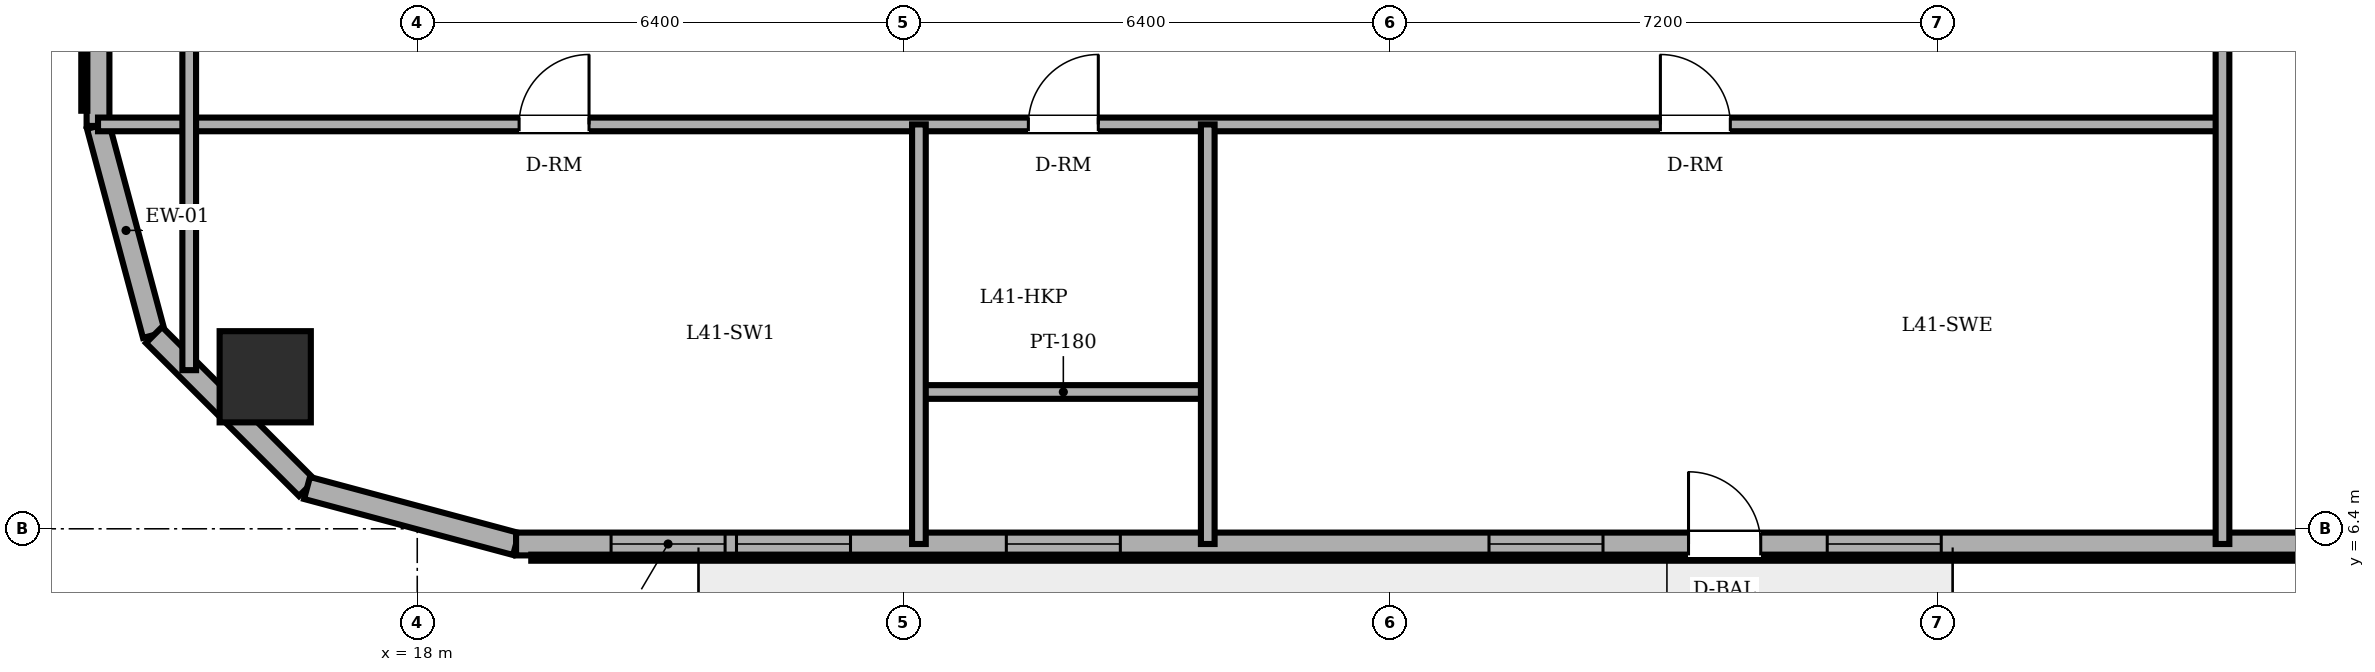
"""IFC4 building model, lengths in metres.
Left out: names, types, materials, properties, quantities, classifications, styles, units other than length and angle.
Written with IfcOpenShell. Run it as: python <this file> out.ifc"""

import sys

from ifc_helpers import new_model, si_unit, direction, frame, frame_2d, origin, origin_2d, place, context, subcontext, project, spatial, rectangle, circle, extrude, element, fill, save


model = new_model("IFC4")
c1 = context("Model", 3, precision=1e-05, world=origin(), true_north=direction((0.0, 1.0)))
c2 = subcontext(c1, "Body", "Model", "MODEL_VIEW")
j1 = project(units=[si_unit("LENGTHUNIT", "METRE"), si_unit("PLANEANGLEUNIT", "RADIAN")], contexts=[c1])
p1 = place(None, origin())
s1 = spatial("IfcSite", under=j1, at=p1, CompositionType="ELEMENT")
p2 = place(p1, origin())
s2 = spatial("IfcBuilding", under=s1, at=p2, CompositionType="ELEMENT")
p3 = place(p2, frame((0.0, 0.0, 158.2)))
s3 = spatial("IfcBuildingStorey", under=s2, at=p3, CompositionType="ELEMENT", Elevation=158.2)
p4 = place(p3, frame((16.0, 8.4, 0.0), z_axis=(0.0, 0.0, 1.0), x_axis=(1.0, 0.0, 0.0)))
e1 = element("IfcColumn", 1, at=p4, inside=s3, PredefinedType="COLUMN", context=c2, shape_type="SweptSolid", body=[
    extrude(circle(Radius=0.6, at=origin_2d()), origin(), (0.0, 0.0, 1.0), 3.6),
])
p5 = place(p3, frame((13.8, 11.7, 0.0), z_axis=(0.0, 0.0, 1.0), x_axis=(0.258884674387, -0.965908238586, 0.0)))
e2 = element("IfcWall", 2, at=p5, inside=s3, PredefinedType="SOLIDWALL", context=c2, shape_type="SweptSolid", body=[
    extrude(rectangle(XDim=2.847, YDim=0.3, at=frame_2d((1.424, 0.0))), origin(), (0.0, 0.0, 1.0), 3.4),
])
p6 = place(p3, frame((14.537, 8.95, 0.0), z_axis=(0.0, 0.0, 1.0), x_axis=(0.707106781187, -0.707106781187, 0.0)))
e3 = element("IfcWall", 3, at=p6, inside=s3, PredefinedType="SOLIDWALL", context=c2, shape_type="SweptSolid", body=[
    extrude(rectangle(XDim=2.847, YDim=0.3, at=frame_2d((1.423, 0.0))), origin(), (0.0, 0.0, 1.0), 3.4),
])
p7 = place(p3, frame((16.55, 6.937, 0.0), z_axis=(0.0, 0.0, 1.0), x_axis=(0.965908238586, -0.258884674387, 0.0)))
e4 = element("IfcWall", 4, at=p7, inside=s3, PredefinedType="SOLIDWALL", context=c2, shape_type="SweptSolid", body=[
    extrude(rectangle(XDim=2.847, YDim=0.3, at=frame_2d((1.424, 0.0))), origin(), (0.0, 0.0, 1.0), 3.4),
])
p8 = place(p3, frame((19.3, 6.2, 0.0), z_axis=(0.0, 0.0, 1.0), x_axis=(1.0, 0.0, 0.0)))
e5 = element("IfcWall", 5, at=p8, inside=s3, PredefinedType="SOLIDWALL", context=c2, shape_type="SweptSolid", body=[
    extrude(rectangle(XDim=30.282, YDim=0.3, at=frame_2d((15.141, 0.0))), origin(), (0.0, 0.0, 1.0), 3.4),
])
p9 = place(p8, frame((15.425, 0.0, 0.0)))
e6 = element("IfcOpeningElement", 6, at=p9, cuts=e5, PredefinedType="OPENING", context=c2, shape_type="SweptSolid", body=[
    extrude(rectangle(XDim=0.95, YDim=2.2, at=frame_2d((0.475, 1.1))), frame((0.0, 0.16, 0.0), z_axis=(0.0, -1.0, 0.0), x_axis=(1.0, 0.0, 0.0)), (0.0, 0.0, 1.0), 0.32),
])
p10 = place(p8, frame((1.25, 0.0, 0.85)))
e7 = element("IfcOpeningElement", 7, at=p10, cuts=e5, PredefinedType="OPENING", context=c2, shape_type="SweptSolid", body=[
    extrude(rectangle(XDim=1.5, YDim=1.55, at=frame_2d((0.75, 0.775))), frame((0.0, 0.16, 0.0), z_axis=(0.0, -1.0, 0.0), x_axis=(1.0, 0.0, 0.0)), (0.0, 0.0, 1.0), 0.32),
])
p11 = place(p8, frame((2.9, 0.0, 0.85)))
e8 = element("IfcOpeningElement", 8, at=p11, cuts=e5, PredefinedType="OPENING", context=c2, shape_type="SweptSolid", body=[
    extrude(rectangle(XDim=1.5, YDim=1.55, at=frame_2d((0.75, 0.775))), frame((0.0, 0.16, 0.0), z_axis=(0.0, -1.0, 0.0), x_axis=(1.0, 0.0, 0.0)), (0.0, 0.0, 1.0), 0.32),
])
p12 = place(p8, frame((6.45, 0.0, 0.85)))
e9 = element("IfcOpeningElement", 9, at=p12, cuts=e5, PredefinedType="OPENING", context=c2, shape_type="SweptSolid", body=[
    extrude(rectangle(XDim=1.5, YDim=1.55, at=frame_2d((0.75, 0.775))), frame((0.0, 0.16, 0.0), z_axis=(0.0, -1.0, 0.0), x_axis=(1.0, 0.0, 0.0)), (0.0, 0.0, 1.0), 0.32),
])
p13 = place(p8, frame((12.8, 0.0, 0.85)))
e10 = element("IfcOpeningElement", 10, at=p13, cuts=e5, PredefinedType="OPENING", context=c2, shape_type="SweptSolid", body=[
    extrude(rectangle(XDim=1.5, YDim=1.55, at=frame_2d((0.75, 0.775))), frame((0.0, 0.16, 0.0), z_axis=(0.0, -1.0, 0.0), x_axis=(1.0, 0.0, 0.0)), (0.0, 0.0, 1.0), 0.32),
])
p14 = place(p8, frame((17.25, 0.0, 0.85)))
e11 = element("IfcOpeningElement", 11, at=p14, cuts=e5, PredefinedType="OPENING", context=c2, shape_type="SweptSolid", body=[
    extrude(rectangle(XDim=1.5, YDim=1.55, at=frame_2d((0.75, 0.775))), frame((0.0, 0.16, 0.0), z_axis=(0.0, -1.0, 0.0), x_axis=(1.0, 0.0, 0.0)), (0.0, 0.0, 1.0), 0.32),
])
p15 = place(p8, frame((24.194, 0.0, 0.85)))
e12 = element("IfcOpeningElement", 12, at=p15, cuts=e5, PredefinedType="OPENING", context=c2, shape_type="SweptSolid", body=[
    extrude(rectangle(XDim=1.5, YDim=1.55, at=frame_2d((0.75, 0.775))), frame((0.0, 0.16, 0.0), z_axis=(0.0, -1.0, 0.0), x_axis=(1.0, 0.0, 0.0)), (0.0, 0.0, 1.0), 0.32),
])
p16 = place(p8, frame((26.688, 0.0, 0.85)))
e13 = element("IfcOpeningElement", 13, at=p16, cuts=e5, PredefinedType="OPENING", context=c2, shape_type="SweptSolid", body=[
    extrude(rectangle(XDim=1.5, YDim=1.55, at=frame_2d((0.75, 0.775))), frame((0.0, 0.16, 0.0), z_axis=(0.0, -1.0, 0.0), x_axis=(1.0, 0.0, 0.0)), (0.0, 0.0, 1.0), 0.32),
])
p17 = place(p3, frame((13.8, 36.3, 0.0), z_axis=(0.0, 0.0, 1.0), x_axis=(0.0, -1.0, 0.0)))
e14 = element("IfcWall", 14, at=p17, inside=s3, PredefinedType="SOLIDWALL", context=c2, shape_type="SweptSolid", body=[
    extrude(rectangle(XDim=24.6, YDim=0.3, at=frame_2d((12.3, 0.0))), origin(), (0.0, 0.0, 1.0), 3.4),
])
p18 = place(p17, frame((8.277, 0.0, 0.85)))
e15 = element("IfcOpeningElement", 15, at=p18, cuts=e14, PredefinedType="OPENING", context=c2, shape_type="SweptSolid", body=[
    extrude(rectangle(XDim=1.5, YDim=1.55, at=frame_2d((0.75, 0.775))), frame((0.0, 0.16, 0.0), z_axis=(0.0, -1.0, 0.0), x_axis=(1.0, 0.0, 0.0)), (0.0, 0.0, 1.0), 0.32),
])
p19 = place(p17, frame((14.823, 0.0, 0.85)))
e16 = element("IfcOpeningElement", 16, at=p19, cuts=e14, PredefinedType="OPENING", context=c2, shape_type="SweptSolid", body=[
    extrude(rectangle(XDim=1.5, YDim=1.55, at=frame_2d((0.75, 0.775))), frame((0.0, 0.16, 0.0), z_axis=(0.0, -1.0, 0.0), x_axis=(1.0, 0.0, 0.0)), (0.0, 0.0, 1.0), 0.32),
])
p20 = place(p3, frame((24.6, 8.2, 0.0), z_axis=(0.0, 0.0, 1.0), x_axis=(1.0, 0.0, 0.0)))
e17 = element("IfcWall", 17, at=p20, inside=s3, PredefinedType="PARTITIONING", context=c2, shape_type="SweptSolid", body=[
    extrude(rectangle(XDim=3.8, YDim=0.18, at=frame_2d((1.9, 0.0))), origin(), (0.0, 0.0, 1.0), 2.882),
])
p21 = place(p3, frame((13.8, 11.72, 0.0), z_axis=(0.0, 0.0, 1.0), x_axis=(1.0, 0.0, 0.0)))
e18 = element("IfcWall", 18, at=p21, inside=s3, PredefinedType="PARTITIONING", context=c2, shape_type="SweptSolid", body=[
    extrude(rectangle(XDim=27.95, YDim=0.18, at=frame_2d((13.975, 0.0))), origin(), (0.0, 0.0, 1.0), 3.4),
])
p22 = place(p21, frame((12.24, 0.0, 0.0)))
e19 = element("IfcOpeningElement", 19, at=p22, cuts=e18, PredefinedType="OPENING", context=c2, shape_type="SweptSolid", body=[
    extrude(rectangle(XDim=0.92, YDim=2.1, at=frame_2d((0.46, 1.05))), frame((0.0, 0.1, 0.0), z_axis=(0.0, -1.0, 0.0), x_axis=(1.0, 0.0, 0.0)), (0.0, 0.0, 1.0), 0.2),
])
p23 = place(p21, frame((5.54, 0.0, 0.0)))
e20 = element("IfcOpeningElement", 20, at=p23, cuts=e18, PredefinedType="OPENING", context=c2, shape_type="SweptSolid", body=[
    extrude(rectangle(XDim=0.92, YDim=2.1, at=frame_2d((0.46, 1.05))), frame((0.0, 0.1, 0.0), z_axis=(0.0, -1.0, 0.0), x_axis=(1.0, 0.0, 0.0)), (0.0, 0.0, 1.0), 0.2),
])
p24 = place(p21, frame((20.555, 0.0, 0.0)))
e21 = element("IfcOpeningElement", 21, at=p24, cuts=e18, PredefinedType="OPENING", context=c2, shape_type="SweptSolid", body=[
    extrude(rectangle(XDim=0.92, YDim=2.1, at=frame_2d((0.46, 1.05))), frame((0.0, 0.1, 0.0), z_axis=(0.0, -1.0, 0.0), x_axis=(1.0, 0.0, 0.0)), (0.0, 0.0, 1.0), 0.2),
])
p25 = place(p3, frame((15.0, 8.487, 0.0), z_axis=(0.0, 0.0, 1.0), x_axis=(0.0, 1.0, 0.0)))
e22 = element("IfcWall", 22, at=p25, inside=s3, PredefinedType="PARTITIONING", context=c2, shape_type="SweptSolid", body=[
    extrude(rectangle(XDim=5.693, YDim=0.18, at=frame_2d((2.846, 0.0))), origin(), (0.0, 0.0, 1.0), 3.4),
])
for number, where, z_axis, x_axis in (
    (23, (24.6, 6.2, 0.0), (0.0, 0.0, 1.0), (0.0, 1.0, 0.0)),
    (24, (28.4, 6.2, 0.0), (0.0, 0.0, 1.0), (0.0, 1.0, 0.0)),
):
    element("IfcWall", number, at=place(p3, frame(where, z_axis=z_axis, x_axis=x_axis)), inside=s3, PredefinedType="PARTITIONING", context=c2, shape_type="SweptSolid", body=[
        extrude(rectangle(XDim=5.52, YDim=0.18, at=frame_2d((2.76, 0.0))), origin(), (0.0, 0.0, 1.0), 3.4),
    ])
p26 = place(p3, frame((41.75, 6.2, 0.0), z_axis=(0.0, 0.0, 1.0), x_axis=(0.0, 1.0, 0.0)))
e25 = element("IfcWall", 25, at=p26, inside=s3, PredefinedType="PARTITIONING", context=c2, shape_type="SweptSolid", body=[
    extrude(rectangle(XDim=16.62, YDim=0.18, at=frame_2d((8.31, 0.0))), origin(), (0.0, 0.0, 1.0), 3.4),
])
p27 = place(p26, frame((10.35, 0.0, 0.0)))
e26 = element("IfcOpeningElement", 26, at=p27, cuts=e25, PredefinedType="OPENING", context=c2, shape_type="SweptSolid", body=[
    extrude(rectangle(XDim=0.92, YDim=2.1, at=frame_2d((0.46, 1.05))), frame((0.0, 0.1, 0.0), z_axis=(0.0, -1.0, 0.0), x_axis=(1.0, 0.0, 0.0)), (0.0, 0.0, 1.0), 0.2),
])
p28 = place(p9, origin())
e27 = element("IfcDoor", 27, at=p28, inside=s3, OperationType="SINGLE_SWING_LEFT", PredefinedType="DOOR", context=c2, shape_type="SweptSolid", body=[
    extrude(rectangle(XDim=0.95, YDim=2.2, at=frame_2d((0.475, 1.1))), frame((0.0, 0.025, 0.0), z_axis=(0.0, -1.0, 0.0), x_axis=(1.0, 0.0, 0.0)), (0.0, 0.0, 1.0), 0.05),
])
fill(e6, e27)
p29 = place(p10, origin())
e28 = element("IfcWindow", 28, at=p29, inside=s3, PartitioningType="DOUBLE_PANEL_VERTICAL", PredefinedType="WINDOW", context=c2, shape_type="SweptSolid", body=[
    extrude(rectangle(XDim=1.5, YDim=1.55, at=frame_2d((0.75, 0.775))), frame((0.0, 0.03, 0.0), z_axis=(0.0, -1.0, 0.0), x_axis=(1.0, 0.0, 0.0)), (0.0, 0.0, 1.0), 0.06),
])
fill(e7, e28)
p30 = place(p11, origin())
e29 = element("IfcWindow", 29, at=p30, inside=s3, PartitioningType="DOUBLE_PANEL_VERTICAL", PredefinedType="WINDOW", context=c2, shape_type="SweptSolid", body=[
    extrude(rectangle(XDim=1.5, YDim=1.55, at=frame_2d((0.75, 0.775))), frame((0.0, 0.03, 0.0), z_axis=(0.0, -1.0, 0.0), x_axis=(1.0, 0.0, 0.0)), (0.0, 0.0, 1.0), 0.06),
])
fill(e8, e29)
p31 = place(p12, origin())
e30 = element("IfcWindow", 30, at=p31, inside=s3, PartitioningType="DOUBLE_PANEL_VERTICAL", PredefinedType="WINDOW", context=c2, shape_type="SweptSolid", body=[
    extrude(rectangle(XDim=1.5, YDim=1.55, at=frame_2d((0.75, 0.775))), frame((0.0, 0.03, 0.0), z_axis=(0.0, -1.0, 0.0), x_axis=(1.0, 0.0, 0.0)), (0.0, 0.0, 1.0), 0.06),
])
fill(e9, e30)
p32 = place(p13, origin())
e31 = element("IfcWindow", 31, at=p32, inside=s3, PartitioningType="DOUBLE_PANEL_VERTICAL", PredefinedType="WINDOW", context=c2, shape_type="SweptSolid", body=[
    extrude(rectangle(XDim=1.5, YDim=1.55, at=frame_2d((0.75, 0.775))), frame((0.0, 0.03, 0.0), z_axis=(0.0, -1.0, 0.0), x_axis=(1.0, 0.0, 0.0)), (0.0, 0.0, 1.0), 0.06),
])
fill(e10, e31)
p33 = place(p14, origin())
e32 = element("IfcWindow", 32, at=p33, inside=s3, PartitioningType="DOUBLE_PANEL_VERTICAL", PredefinedType="WINDOW", context=c2, shape_type="SweptSolid", body=[
    extrude(rectangle(XDim=1.5, YDim=1.55, at=frame_2d((0.75, 0.775))), frame((0.0, 0.03, 0.0), z_axis=(0.0, -1.0, 0.0), x_axis=(1.0, 0.0, 0.0)), (0.0, 0.0, 1.0), 0.06),
])
fill(e11, e32)
p34 = place(p22, origin())
e33 = element("IfcDoor", 33, at=p34, inside=s3, OperationType="SINGLE_SWING_RIGHT", PredefinedType="DOOR", context=c2, shape_type="SweptSolid", body=[
    extrude(rectangle(XDim=0.92, YDim=2.1, at=frame_2d((0.46, 1.05))), frame((0.0, 0.025, 0.0), z_axis=(0.0, -1.0, 0.0), x_axis=(1.0, 0.0, 0.0)), (0.0, 0.0, 1.0), 0.05),
])
fill(e19, e33)
p35 = place(p23, origin())
e34 = element("IfcDoor", 34, at=p35, inside=s3, OperationType="SINGLE_SWING_RIGHT", PredefinedType="DOOR", context=c2, shape_type="SweptSolid", body=[
    extrude(rectangle(XDim=0.92, YDim=2.1, at=frame_2d((0.46, 1.05))), frame((0.0, 0.025, 0.0), z_axis=(0.0, -1.0, 0.0), x_axis=(1.0, 0.0, 0.0)), (0.0, 0.0, 1.0), 0.05),
])
fill(e20, e34)
p36 = place(p24, origin())
e35 = element("IfcDoor", 35, at=p36, inside=s3, OperationType="SINGLE_SWING_LEFT", PredefinedType="DOOR", context=c2, shape_type="SweptSolid", body=[
    extrude(rectangle(XDim=0.92, YDim=2.1, at=frame_2d((0.46, 1.05))), frame((0.0, 0.025, 0.0), z_axis=(0.0, -1.0, 0.0), x_axis=(1.0, 0.0, 0.0)), (0.0, 0.0, 1.0), 0.05),
])
fill(e21, e35)
save(model, sys.argv[1])
